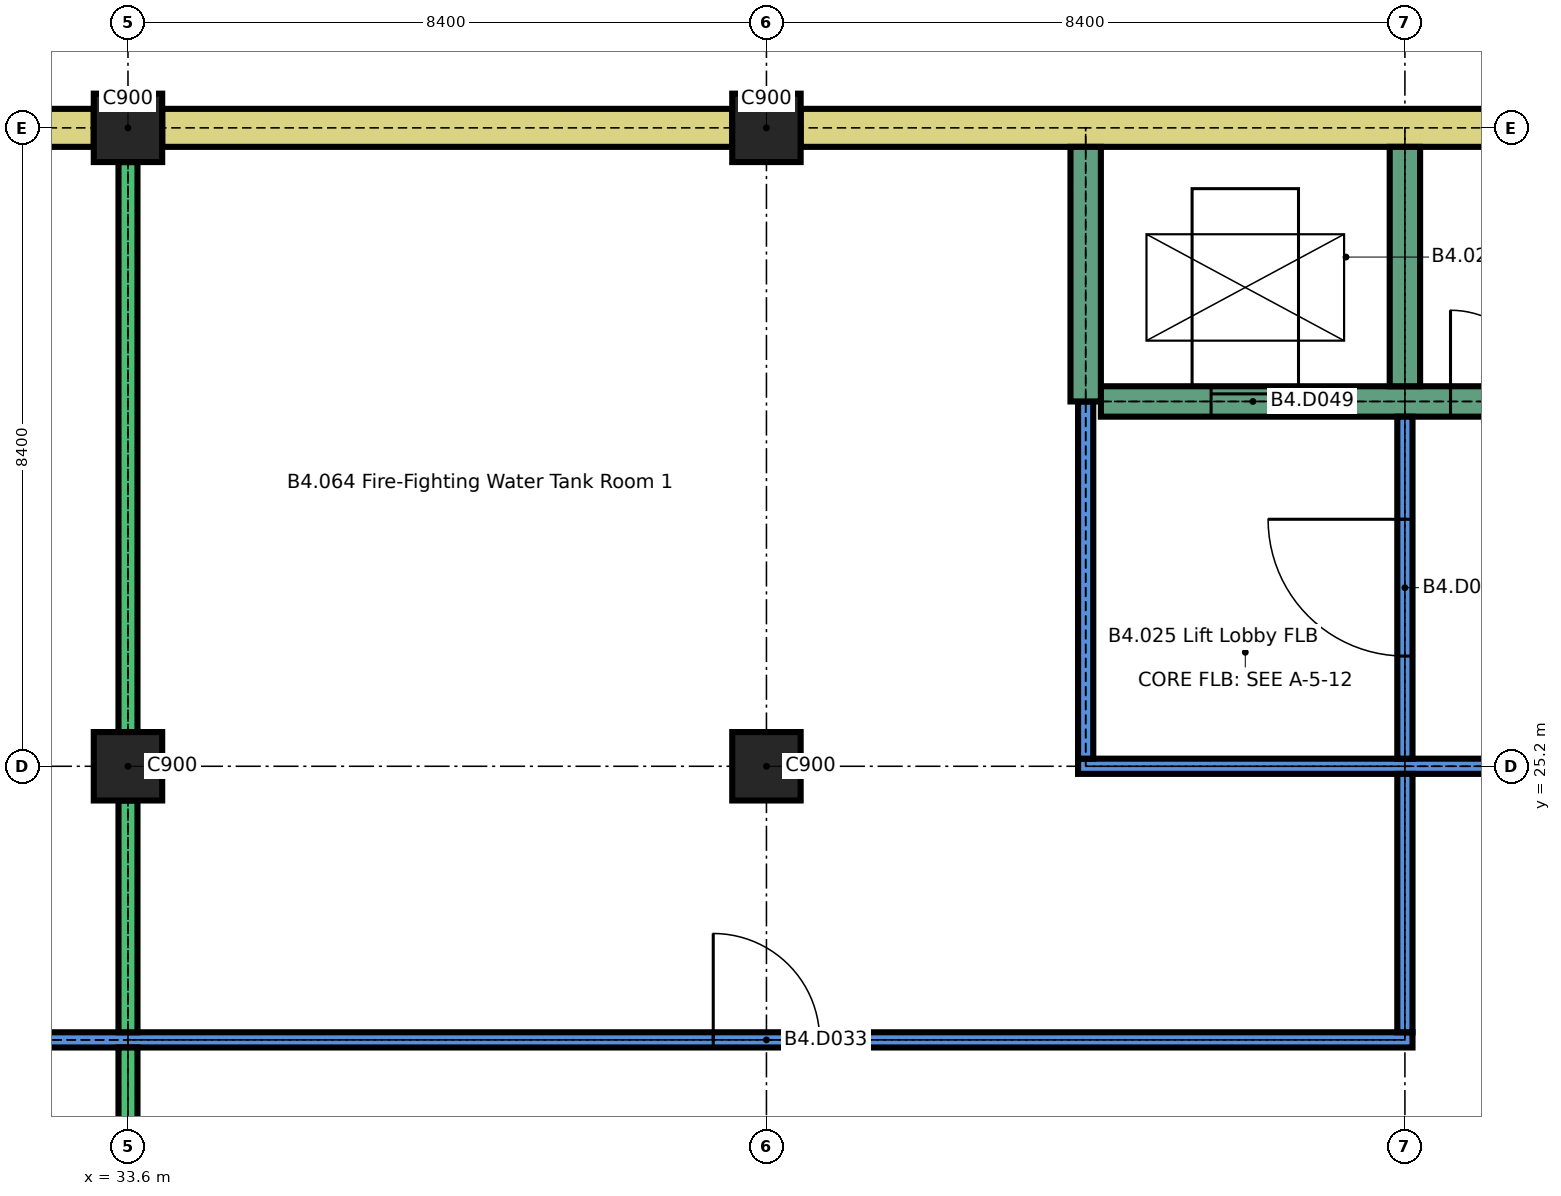
"""IFC4 building model, lengths in metres.
Left out: names, types, materials, properties, quantities, classifications, styles, units other than length and angle.
Written with IfcOpenShell. Run it as: python <this file> out.ifc"""

import sys

from ifc_helpers import new_model, si_unit, direction, frame, frame_2d, origin, origin_2d, place, context, subcontext, project, spatial, rectangle, extrude, element, fill, save


model = new_model("IFC4")
c1 = context("Model", 3, precision=1e-05, world=origin(), true_north=direction((0.0, 1.0)))
c2 = subcontext(c1, "Body", "Model", "MODEL_VIEW")
j1 = project(units=[si_unit("LENGTHUNIT", "METRE"), si_unit("PLANEANGLEUNIT", "RADIAN")], contexts=[c1])
p1 = place(None, origin())
s1 = spatial("IfcSite", under=j1, at=p1, CompositionType="ELEMENT")
p2 = place(p1, origin())
s2 = spatial("IfcBuilding", under=s1, at=p2, CompositionType="ELEMENT")
p3 = place(p2, frame((0.0, 0.0, -15.0)))
s3 = spatial("IfcBuildingStorey", under=s2, at=p3, CompositionType="ELEMENT", Elevation=-15.0)
for number, where, z_axis, x_axis in (
    (1, (33.6, 25.2, 0.0), (0.0, 0.0, 1.0), (1.0, 0.0, 0.0)),
    (2, (42.0, 25.2, 0.0), (0.0, 0.0, 1.0), (1.0, 0.0, 0.0)),
    (3, (33.6, 33.6, 0.0), (0.0, 0.0, 1.0), (1.0, 0.0, 0.0)),
    (4, (42.0, 33.6, 0.0), (0.0, 0.0, 1.0), (1.0, 0.0, 0.0)),
):
    element("IfcColumn", number, at=place(p3, frame(where, z_axis=z_axis, x_axis=x_axis)), inside=s3, PredefinedType="COLUMN", context=c2, shape_type="SweptSolid", body=[
        extrude(rectangle(XDim=0.9, YDim=0.9, at=origin_2d()), origin(), (0.0, 0.0, 1.0), 3.2),
    ])
for number, where, z_axis, x_axis in (
    (5, (25.65, 33.6, 0.0), (0.0, 0.0, 1.0), (1.0, 0.0, 0.0)),
    (6, (34.05, 33.6, 0.0), (0.0, 0.0, 1.0), (1.0, 0.0, 0.0)),
):
    element("IfcWall", number, at=place(p3, frame(where, z_axis=z_axis, x_axis=x_axis)), inside=s3, PredefinedType="SOLIDWALL", context=c2, shape_type="SweptSolid", body=[
        extrude(rectangle(XDim=7.5, YDim=0.5, at=frame_2d((3.75, 0.0))), origin(), (0.0, 0.0, 1.0), 3.2),
    ])
p4 = place(p3, frame((42.45, 33.6, 0.0), z_axis=(0.0, 0.0, 1.0), x_axis=(1.0, 0.0, 0.0)))
e7 = element("IfcWall", 7, at=p4, inside=s3, PredefinedType="SOLIDWALL", context=c2, shape_type="SweptSolid", body=[
    extrude(rectangle(XDim=41.1, YDim=0.5, at=frame_2d((20.55, 0.0))), origin(), (0.0, 0.0, 1.0), 3.2),
])
p5 = place(p3, frame((29.4, 21.6, 0.0), z_axis=(0.0, 0.0, 1.0), x_axis=(1.0, 0.0, 0.0)))
e8 = element("IfcWall", 8, at=p5, inside=s3, PredefinedType="PARTITIONING", context=c2, shape_type="SweptSolid", body=[
    extrude(rectangle(XDim=21.1, YDim=0.2, at=frame_2d((10.55, 0.0))), origin(), (0.0, 0.0, 1.0), 3.2),
])
p6 = place(p5, frame((11.9, 0.0, 0.0)))
e9 = element("IfcOpeningElement", 9, at=p6, cuts=e8, PredefinedType="OPENING", context=c2, shape_type="SweptSolid", body=[
    extrude(rectangle(XDim=1.4, YDim=2.1, at=frame_2d((0.7, 1.05))), frame((0.0, 0.11, 0.0), z_axis=(0.0, -1.0, 0.0), x_axis=(1.0, 0.0, 0.0)), (0.0, 0.0, 1.0), 0.22),
])
p7 = place(p3, frame((46.1, 25.2, 0.0), z_axis=(0.0, 0.0, 1.0), x_axis=(1.0, 0.0, 0.0)))
e10 = element("IfcWall", 10, at=p7, inside=s3, PredefinedType="PARTITIONING", context=c2, shape_type="SweptSolid", body=[
    extrude(rectangle(XDim=12.6, YDim=0.2, at=frame_2d((6.3, 0.0))), origin(), (0.0, 0.0, 1.0), 3.2),
])
p8 = place(p7, frame((7.75, 0.0, 0.0)))
e11 = element("IfcOpeningElement", 11, at=p8, cuts=e10, PredefinedType="OPENING", context=c2, shape_type="SweptSolid", body=[
    extrude(rectangle(XDim=1.4, YDim=2.1, at=frame_2d((0.7, 1.05))), frame((0.0, 0.11, 0.0), z_axis=(0.0, -1.0, 0.0), x_axis=(1.0, 0.0, 0.0)), (0.0, 0.0, 1.0), 0.22),
])
p9 = place(p3, frame((46.4, 30.0, 0.0), z_axis=(0.0, 0.0, 1.0), x_axis=(1.0, 0.0, 0.0)))
e12 = element("IfcWall", 12, at=p9, inside=s3, PredefinedType="SHEAR", context=c2, shape_type="SweptSolid", body=[
    extrude(rectangle(XDim=12.2, YDim=0.4, at=frame_2d((6.1, 0.0))), origin(), (0.0, 0.0, 1.0), 3.2),
])
p10 = place(p9, frame((1.45, 0.0, 0.0)))
e13 = element("IfcOpeningElement", 13, at=p10, cuts=e12, PredefinedType="OPENING", context=c2, shape_type="SweptSolid", body=[
    extrude(rectangle(XDim=1.1, YDim=2.1, at=frame_2d((0.55, 1.05))), frame((0.0, 0.21, 0.0), z_axis=(0.0, -1.0, 0.0), x_axis=(1.0, 0.0, 0.0)), (0.0, 0.0, 1.0), 0.42),
])
p11 = place(p9, frame((4.6, 0.0, 0.0)))
e14 = element("IfcOpeningElement", 14, at=p11, cuts=e12, PredefinedType="OPENING", context=c2, shape_type="SweptSolid", body=[
    extrude(rectangle(XDim=1.2, YDim=2.1, at=frame_2d((0.6, 1.05))), frame((0.0, 0.21, 0.0), z_axis=(0.0, -1.0, 0.0), x_axis=(1.0, 0.0, 0.0)), (0.0, 0.0, 1.0), 0.42),
])
p12 = place(p3, frame((33.6, 17.25, 0.0), z_axis=(0.0, 0.0, 1.0), x_axis=(0.0, 1.0, 0.0)))
e15 = element("IfcWall", 15, at=p12, inside=s3, PredefinedType="SOLIDWALL", context=c2, shape_type="SweptSolid", body=[
    extrude(rectangle(XDim=4.25, YDim=0.25, at=frame_2d((2.125, 0.0))), origin(), (0.0, 0.0, 1.0), 3.2),
])
p13 = place(p12, frame((1.425, 0.0, 0.0)))
e16 = element("IfcOpeningElement", 16, at=p13, cuts=e15, PredefinedType="OPENING", context=c2, shape_type="SweptSolid", body=[
    extrude(rectangle(XDim=1.4, YDim=2.1, at=frame_2d((0.7, 1.05))), frame((0.0, 0.135, 0.0), z_axis=(0.0, -1.0, 0.0), x_axis=(1.0, 0.0, 0.0)), (0.0, 0.0, 1.0), 0.27),
])
p14 = place(p3, frame((33.6, 21.7, 0.0), z_axis=(0.0, 0.0, 1.0), x_axis=(0.0, 1.0, 0.0)))
e17 = element("IfcWall", 17, at=p14, inside=s3, PredefinedType="SOLIDWALL", context=c2, shape_type="SweptSolid", body=[
    extrude(rectangle(XDim=3.05, YDim=0.25, at=frame_2d((1.525, 0.0))), origin(), (0.0, 0.0, 1.0), 3.2),
])
p15 = place(p3, frame((33.6, 25.65, 0.0), z_axis=(0.0, 0.0, 1.0), x_axis=(0.0, 1.0, 0.0)))
e18 = element("IfcWall", 18, at=p15, inside=s3, PredefinedType="SOLIDWALL", context=c2, shape_type="SweptSolid", body=[
    extrude(rectangle(XDim=7.5, YDim=0.25, at=frame_2d((3.75, 0.0))), origin(), (0.0, 0.0, 1.0), 3.2),
])
p16 = place(p3, frame((46.2, 25.3, 0.0), z_axis=(0.0, 0.0, 1.0), x_axis=(0.0, 1.0, 0.0)))
e19 = element("IfcWall", 19, at=p16, inside=s3, PredefinedType="PARTITIONING", context=c2, shape_type="SweptSolid", body=[
    extrude(rectangle(XDim=4.7, YDim=0.2, at=frame_2d((2.35, 0.0))), origin(), (0.0, 0.0, 1.0), 3.2),
])
p17 = place(p3, frame((46.2, 30.0, 0.0), z_axis=(0.0, 0.0, 1.0), x_axis=(0.0, 1.0, 0.0)))
e20 = element("IfcWall", 20, at=p17, inside=s3, PredefinedType="SHEAR", context=c2, shape_type="SweptSolid", body=[
    extrude(rectangle(XDim=3.35, YDim=0.4, at=frame_2d((1.675, 0.0))), origin(), (0.0, 0.0, 1.0), 3.2),
])
p18 = place(p3, frame((50.4, 21.7, 0.0), z_axis=(0.0, 0.0, 1.0), x_axis=(0.0, 1.0, 0.0)))
e21 = element("IfcWall", 21, at=p18, inside=s3, PredefinedType="PARTITIONING", context=c2, shape_type="SweptSolid", body=[
    extrude(rectangle(XDim=3.4, YDim=0.2, at=frame_2d((1.7, 0.0))), origin(), (0.0, 0.0, 1.0), 3.2),
])
p19 = place(p3, frame((50.4, 25.3, 0.0), z_axis=(0.0, 0.0, 1.0), x_axis=(0.0, 1.0, 0.0)))
e22 = element("IfcWall", 22, at=p19, inside=s3, PredefinedType="PARTITIONING", context=c2, shape_type="SweptSolid", body=[
    extrude(rectangle(XDim=4.5, YDim=0.2, at=frame_2d((2.25, 0.0))), origin(), (0.0, 0.0, 1.0), 3.2),
])
p20 = place(p19, frame((1.35, 0.0, 0.0)))
e23 = element("IfcOpeningElement", 23, at=p20, cuts=e22, PredefinedType="OPENING", context=c2, shape_type="SweptSolid", body=[
    extrude(rectangle(XDim=1.8, YDim=2.4, at=frame_2d((0.9, 1.2))), frame((0.0, 0.11, 0.0), z_axis=(0.0, -1.0, 0.0), x_axis=(1.0, 0.0, 0.0)), (0.0, 0.0, 1.0), 0.22),
])
p21 = place(p3, frame((50.4, 30.2, 0.0), z_axis=(0.0, 0.0, 1.0), x_axis=(0.0, 1.0, 0.0)))
e24 = element("IfcWall", 24, at=p21, inside=s3, PredefinedType="SHEAR", context=c2, shape_type="SweptSolid", body=[
    extrude(rectangle(XDim=3.15, YDim=0.4, at=frame_2d((1.575, 0.0))), origin(), (0.0, 0.0, 1.0), 3.2),
])
p22 = place(p6, origin())
e25 = element("IfcDoor", 25, at=p22, inside=s3, OperationType="SINGLE_SWING_RIGHT", PredefinedType="DOOR", context=c2, shape_type="SweptSolid", body=[
    extrude(rectangle(XDim=1.4, YDim=2.1, at=frame_2d((0.7, 1.05))), frame((0.0, 0.025, 0.0), z_axis=(0.0, -1.0, 0.0), x_axis=(1.0, 0.0, 0.0)), (0.0, 0.0, 1.0), 0.05),
])
fill(e9, e25)
p23 = place(p10, origin())
e26 = element("IfcDoor", 26, at=p23, inside=s3, OperationType="SLIDING_TO_LEFT", PredefinedType="DOOR", context=c2, shape_type="SweptSolid", body=[
    extrude(rectangle(XDim=1.1, YDim=2.1, at=frame_2d((0.55, 1.05))), frame((0.0, 0.025, 0.0), z_axis=(0.0, -1.0, 0.0), x_axis=(1.0, 0.0, 0.0)), (0.0, 0.0, 1.0), 0.05),
])
fill(e13, e26)
p24 = place(p11, origin())
e27 = element("IfcDoor", 27, at=p24, inside=s3, OperationType="SINGLE_SWING_RIGHT", PredefinedType="DOOR", context=c2, shape_type="SweptSolid", body=[
    extrude(rectangle(XDim=1.2, YDim=2.1, at=frame_2d((0.6, 1.05))), frame((0.0, 0.025, 0.0), z_axis=(0.0, -1.0, 0.0), x_axis=(1.0, 0.0, 0.0)), (0.0, 0.0, 1.0), 0.05),
])
fill(e14, e27)
p25 = place(p20, origin())
e28 = element("IfcDoor", 28, at=p25, inside=s3, OperationType="SINGLE_SWING_LEFT", PredefinedType="DOOR", context=c2, shape_type="SweptSolid", body=[
    extrude(rectangle(XDim=1.8, YDim=2.4, at=frame_2d((0.9, 1.2))), frame((0.0, 0.025, 0.0), z_axis=(0.0, -1.0, 0.0), x_axis=(1.0, 0.0, 0.0)), (0.0, 0.0, 1.0), 0.05),
])
fill(e23, e28)
save(model, sys.argv[1])
